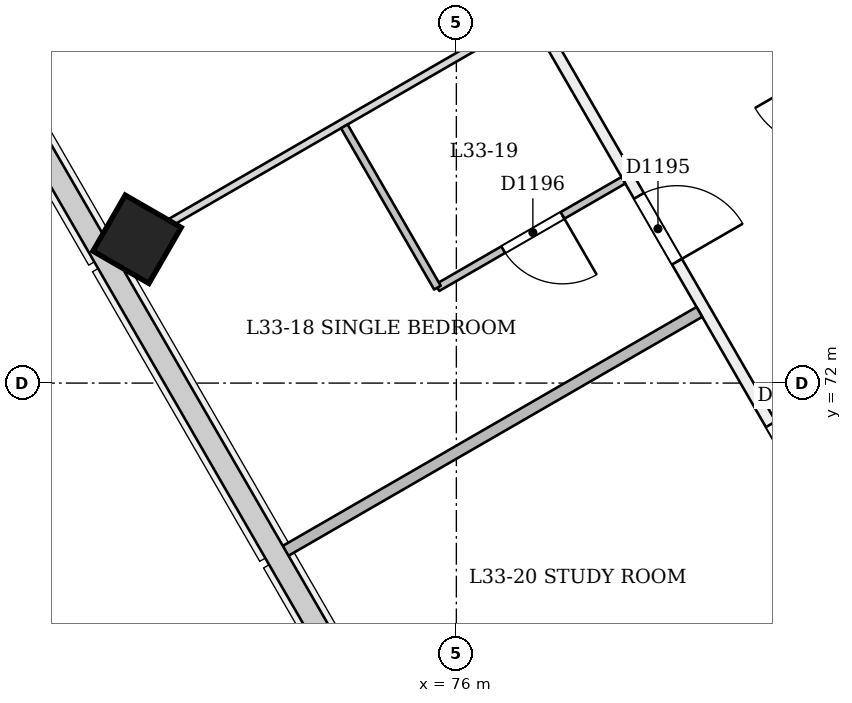
"""IFC4 building model, lengths in metres.
Left out: names, types, materials, properties, quantities, classifications, styles, units other than length and angle.
Written with IfcOpenShell. Run it as: python <this file> out.ifc"""

import sys

from ifc_helpers import new_model, si_unit, direction, frame, frame_2d, origin, origin_2d, place, context, subcontext, project, spatial, rectangle, extrude, element, fill, save


model = new_model("IFC4")
c1 = context("Model", 3, precision=1e-05, world=origin(), true_north=direction((0.0, 1.0)))
c2 = subcontext(c1, "Body", "Model", "MODEL_VIEW")
j1 = project(units=[si_unit("LENGTHUNIT", "METRE"), si_unit("PLANEANGLEUNIT", "RADIAN")], contexts=[c1])
p1 = place(None, origin())
s1 = spatial("IfcSite", under=j1, at=p1, CompositionType="ELEMENT")
p2 = place(p1, origin())
s2 = spatial("IfcBuilding", under=s1, at=p2, CompositionType="ELEMENT")
p3 = place(p2, frame((0.0, 0.0, 131.4)))
s3 = spatial("IfcBuildingStorey", under=s2, at=p3, CompositionType="ELEMENT", Elevation=131.4)
p4 = place(p3, frame((71.772, 73.845, -0.026), z_axis=(0.022222852987, 0.038483477124, 0.999012095419), x_axis=(-0.86564203211, -0.499182083575, 0.038485317735)))
e1 = element("IfcColumn", 1, at=p4, inside=s3, PredefinedType="COLUMN", context=c2, shape_type="SweptSolid", body=[
    extrude(rectangle(XDim=0.85, YDim=0.85, at=origin_2d()), origin(), (0.0, 0.0, 1.0), 3.604),
])
p5 = place(p3, frame((85.0, 68.836, 0.0), z_axis=(0.0, 0.0, 1.0), x_axis=(-0.500001726771, 0.86602440683, 0.0)))
e2 = element("IfcWall", 2, at=p5, inside=s3, PredefinedType="PARTITIONING", context=c2, shape_type="SweptSolid", body=[
    extrude(rectangle(XDim=24.669, YDim=0.15, at=frame_2d((12.335, 0.0))), origin(), (0.0, 0.0, 1.0), 3.15),
])
p6 = place(p5, frame((2.99, 0.0, 0.0)))
e3 = element("IfcOpeningElement", 3, at=p6, cuts=e2, PredefinedType="OPENING", context=c2, shape_type="SweptSolid", body=[
    extrude(rectangle(XDim=1.0, YDim=2.1, at=frame_2d((0.5, 1.05))), frame((0.0, 0.085, 0.0), z_axis=(0.0, -1.0, 0.0), x_axis=(1.0, 0.0, 0.0)), (0.0, 0.0, 1.0), 0.171),
])
p7 = place(p5, frame((15.596, 0.0, 0.0)))
e4 = element("IfcOpeningElement", 4, at=p7, cuts=e2, PredefinedType="OPENING", context=c2, shape_type="SweptSolid", body=[
    extrude(rectangle(XDim=1.0, YDim=2.1, at=frame_2d((0.5, 1.05))), frame((0.0, 0.085, 0.0), z_axis=(0.0, -1.0, 0.0), x_axis=(1.0, 0.0, 0.0)), (0.0, 0.0, 1.0), 0.171),
])
p8 = place(p5, frame((20.822, 0.0, 0.0)))
e5 = element("IfcOpeningElement", 5, at=p8, cuts=e2, PredefinedType="OPENING", context=c2, shape_type="SweptSolid", body=[
    extrude(rectangle(XDim=1.0, YDim=2.1, at=frame_2d((0.5, 1.05))), frame((0.0, 0.085, 0.0), z_axis=(0.0, -1.0, 0.0), x_axis=(1.0, 0.0, 0.0)), (0.0, 0.0, 1.0), 0.171),
])
p9 = place(p5, frame((11.43, 0.0, 0.0)))
e6 = element("IfcOpeningElement", 6, at=p9, cuts=e2, PredefinedType="OPENING", context=c2, shape_type="SweptSolid", body=[
    extrude(rectangle(XDim=1.0, YDim=2.1, at=frame_2d((0.5, 1.05))), frame((0.0, 0.085, 0.0), z_axis=(0.0, -1.0, 0.0), x_axis=(1.0, 0.0, 0.0)), (0.0, 0.0, 1.0), 0.171),
])
p10 = place(p5, frame((7.41, 0.0, 0.0)))
e7 = element("IfcOpeningElement", 7, at=p10, cuts=e2, PredefinedType="OPENING", context=c2, shape_type="SweptSolid", body=[
    extrude(rectangle(XDim=1.0, YDim=2.1, at=frame_2d((0.5, 1.05))), frame((0.0, 0.085, 0.0), z_axis=(0.0, -1.0, 0.0), x_axis=(1.0, 0.0, 0.0)), (0.0, 0.0, 1.0), 0.171),
])
p11 = place(p3, frame((64.656, 98.273, 0.0), z_axis=(0.0, 0.0, 1.0), x_axis=(0.500001784794, -0.866024373331, 0.0)))
e8 = element("IfcWall", 8, at=p11, inside=s3, PredefinedType="PARTITIONING", context=c2, shape_type="SweptSolid", body=[
    extrude(rectangle(XDim=40.426, YDim=0.15, at=frame_2d((20.213, 0.0))), origin(), (0.0, 0.0, 1.0), 2.75),
])
p12 = place(p11, frame((0.2, 0.0, 0.0)))
e9 = element("IfcOpeningElement", 9, at=p12, cuts=e8, PredefinedType="OPENING", context=c2, shape_type="SweptSolid", body=[
    extrude(rectangle(XDim=1.2, YDim=2.1, at=frame_2d((0.6, 1.05))), frame((0.0, 0.085, 0.0), z_axis=(0.0, -1.0, 0.0), x_axis=(1.0, 0.0, 0.0)), (0.0, 0.0, 1.0), 0.171),
])
p13 = place(p11, frame((2.933, 0.0, 0.0)))
e10 = element("IfcOpeningElement", 10, at=p13, cuts=e8, PredefinedType="OPENING", context=c2, shape_type="SweptSolid", body=[
    extrude(rectangle(XDim=1.0, YDim=2.1, at=frame_2d((0.5, 1.05))), frame((0.0, 0.085, 0.0), z_axis=(0.0, -1.0, 0.0), x_axis=(1.0, 0.0, 0.0)), (0.0, 0.0, 1.0), 0.171),
])
p14 = place(p11, frame((9.608, 0.0, 0.0)))
e11 = element("IfcOpeningElement", 11, at=p14, cuts=e8, PredefinedType="OPENING", context=c2, shape_type="SweptSolid", body=[
    extrude(rectangle(XDim=1.0, YDim=2.1, at=frame_2d((0.5, 1.05))), frame((0.0, 0.085, 0.0), z_axis=(0.0, -1.0, 0.0), x_axis=(1.0, 0.0, 0.0)), (0.0, 0.0, 1.0), 0.171),
])
p15 = place(p11, frame((11.818, 0.0, 0.0)))
e12 = element("IfcOpeningElement", 12, at=p15, cuts=e8, PredefinedType="OPENING", context=c2, shape_type="SweptSolid", body=[
    extrude(rectangle(XDim=1.0, YDim=2.1, at=frame_2d((0.5, 1.05))), frame((0.0, 0.085, 0.0), z_axis=(0.0, -1.0, 0.0), x_axis=(1.0, 0.0, 0.0)), (0.0, 0.0, 1.0), 0.171),
])
p16 = place(p11, frame((18.493, 0.0, 0.0)))
e13 = element("IfcOpeningElement", 13, at=p16, cuts=e8, PredefinedType="OPENING", context=c2, shape_type="SweptSolid", body=[
    extrude(rectangle(XDim=1.0, YDim=2.1, at=frame_2d((0.5, 1.05))), frame((0.0, 0.085, 0.0), z_axis=(0.0, -1.0, 0.0), x_axis=(1.0, 0.0, 0.0)), (0.0, 0.0, 1.0), 0.171),
])
p17 = place(p11, frame((21.963, 0.0, 0.0)))
e14 = element("IfcOpeningElement", 14, at=p17, cuts=e8, PredefinedType="OPENING", context=c2, shape_type="SweptSolid", body=[
    extrude(rectangle(XDim=1.0, YDim=2.1, at=frame_2d((0.5, 1.05))), frame((0.0, 0.085, 0.0), z_axis=(0.0, -1.0, 0.0), x_axis=(1.0, 0.0, 0.0)), (0.0, 0.0, 1.0), 0.171),
])
p18 = place(p11, frame((27.493, 0.0, 0.0)))
e15 = element("IfcOpeningElement", 15, at=p18, cuts=e8, PredefinedType="OPENING", context=c2, shape_type="SweptSolid", body=[
    extrude(rectangle(XDim=1.0, YDim=2.1, at=frame_2d((0.5, 1.05))), frame((0.0, 0.085, 0.0), z_axis=(0.0, -1.0, 0.0), x_axis=(1.0, 0.0, 0.0)), (0.0, 0.0, 1.0), 0.171),
])
p19 = place(p11, frame((30.963, 0.0, 0.0)))
e16 = element("IfcOpeningElement", 16, at=p19, cuts=e8, PredefinedType="OPENING", context=c2, shape_type="SweptSolid", body=[
    extrude(rectangle(XDim=1.0, YDim=2.1, at=frame_2d((0.5, 1.05))), frame((0.0, 0.085, 0.0), z_axis=(0.0, -1.0, 0.0), x_axis=(1.0, 0.0, 0.0)), (0.0, 0.0, 1.0), 0.171),
])
p20 = place(p11, frame((36.493, 0.0, 0.0)))
e17 = element("IfcOpeningElement", 17, at=p20, cuts=e8, PredefinedType="OPENING", context=c2, shape_type="SweptSolid", body=[
    extrude(rectangle(XDim=1.0, YDim=2.1, at=frame_2d((0.5, 1.05))), frame((0.0, 0.085, 0.0), z_axis=(0.0, -1.0, 0.0), x_axis=(1.0, 0.0, 0.0)), (0.0, 0.0, 1.0), 0.171),
])
p21 = place(p11, frame((39.101, 0.0, 0.0)))
e18 = element("IfcOpeningElement", 18, at=p21, cuts=e8, PredefinedType="OPENING", context=c2, shape_type="SweptSolid", body=[
    extrude(rectangle(XDim=1.0, YDim=2.1, at=frame_2d((0.5, 1.05))), frame((0.0, 0.085, 0.0), z_axis=(0.0, -1.0, 0.0), x_axis=(1.0, 0.0, 0.0)), (0.0, 0.0, 1.0), 0.171),
])
p22 = place(p3, frame((71.47, 73.671, 0.0), z_axis=(0.0, 0.0, 1.0), x_axis=(0.866015887322, 0.500016482634, 0.0)))
e19 = element("IfcWall", 19, at=p22, inside=s3, PredefinedType="PARTITIONING", context=c2, shape_type="SweptSolid", body=[
    extrude(rectangle(XDim=6.325, YDim=0.1, at=frame_2d((3.163, 0.0))), origin(), (0.0, 0.0, 1.0), 2.65),
])
p23 = place(p3, frame((78.197, 74.668, 0.0), z_axis=(0.0, 0.0, 1.0), x_axis=(-0.865989837833, -0.500061596976, 0.0)))
e20 = element("IfcWall", 20, at=p23, inside=s3, PredefinedType="PARTITIONING", context=c2, shape_type="SweptSolid", body=[
    extrude(rectangle(XDim=2.825, YDim=0.1, at=frame_2d((1.413, 0.0))), origin(), (0.0, 0.0, 1.0), 3.15),
])
p24 = place(p23, frame((0.925, 0.0, 0.0)))
e21 = element("IfcOpeningElement", 21, at=p24, cuts=e20, PredefinedType="OPENING", context=c2, shape_type="SweptSolid", body=[
    extrude(rectangle(XDim=0.9, YDim=2.1, at=frame_2d((0.45, 1.05))), frame((0.0, 0.061, 0.0), z_axis=(0.0, -1.0, 0.0), x_axis=(1.0, 0.0, 0.0)), (0.0, 0.0, 1.0), 0.121),
])
p25 = place(p3, frame((75.751, 73.256, 0.0), z_axis=(0.0, 0.0, 1.0), x_axis=(-0.500018594424, 0.866014668023, 0.0)))
e22 = element("IfcWall", 22, at=p25, inside=s3, PredefinedType="PARTITIONING", context=c2, shape_type="SweptSolid", body=[
    extrude(rectangle(XDim=2.45, YDim=0.1, at=frame_2d((1.225, 0.0))), origin(), (0.0, 0.0, 1.0), 2.75),
])
p26 = place(p3, frame((73.702, 69.763, 0.0), z_axis=(0.0, 0.0, 1.0), x_axis=(0.866025401434, 0.500000004071, 0.0)))
e23 = element("IfcWall", 23, at=p26, inside=s3, PredefinedType="PARTITIONING", context=c2, shape_type="SweptSolid", body=[
    extrude(rectangle(XDim=6.345, YDim=0.15, at=frame_2d((3.173, 0.0))), origin(), (0.0, 0.0, 1.0), 2.65),
])
p27 = place(p3, frame((79.001, 67.626, 0.0), z_axis=(0.0, 0.0, 1.0), x_axis=(0.865989837833, 0.500061596976, 0.0)))
e24 = element("IfcWall", 24, at=p27, inside=s3, PredefinedType="PARTITIONING", context=c2, shape_type="SweptSolid", body=[
    extrude(rectangle(XDim=2.825, YDim=0.1, at=frame_2d((1.413, 0.0))), origin(), (0.0, 0.0, 1.0), 2.75),
])
p28 = place(p18, origin())
e25 = element("IfcDoor", 25, at=p28, inside=s3, OperationType="SINGLE_SWING_RIGHT", PredefinedType="NOTDEFINED", context=c2, shape_type="SweptSolid", body=[
    extrude(rectangle(XDim=1.0, YDim=2.1, at=frame_2d((0.5, 1.05))), frame((0.0, 0.025, 0.0), z_axis=(0.0, -1.0, 0.0), x_axis=(1.0, 0.0, 0.0)), (0.0, 0.0, 1.0), 0.05),
])
fill(e15, e25)
p29 = place(p24, origin())
e26 = element("IfcDoor", 26, at=p29, inside=s3, OperationType="SINGLE_SWING_LEFT", PredefinedType="NOTDEFINED", context=c2, shape_type="SweptSolid", body=[
    extrude(rectangle(XDim=0.9, YDim=2.1, at=frame_2d((0.45, 1.05))), frame((0.0, 0.025, 0.0), z_axis=(0.0, -1.0, 0.0), x_axis=(1.0, 0.0, 0.0)), (0.0, 0.0, 1.0), 0.05),
])
fill(e21, e26)
p30 = place(p19, origin())
e27 = element("IfcDoor", 27, at=p30, inside=s3, OperationType="SINGLE_SWING_RIGHT", PredefinedType="NOTDEFINED", context=c2, shape_type="SweptSolid", body=[
    extrude(rectangle(XDim=1.0, YDim=2.1, at=frame_2d((0.5, 1.05))), frame((0.0, 0.025, 0.0), z_axis=(0.0, -1.0, 0.0), x_axis=(1.0, 0.0, 0.0)), (0.0, 0.0, 1.0), 0.05),
])
fill(e16, e27)
save(model, sys.argv[1])
